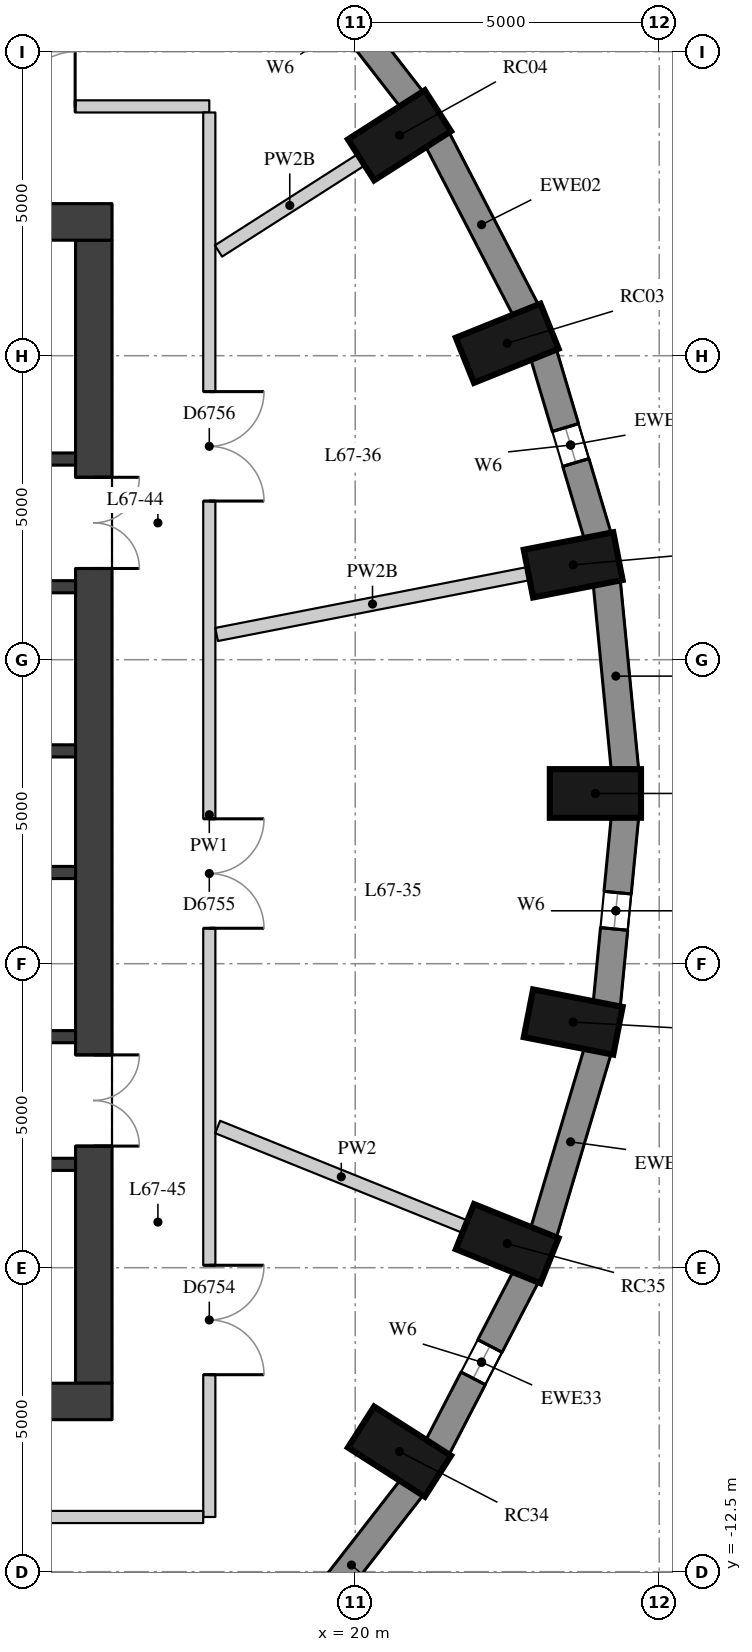
"""IFC4 building model, lengths in metres.
Left out: names, types, materials, properties, quantities, classifications, styles, units other than length and angle.
Written with IfcOpenShell. Run it as: python <this file> out.ifc"""

import sys

from ifc_helpers import new_model, si_unit, direction, frame, frame_2d, origin, origin_2d, place, context, subcontext, project, spatial, rectangle, extrude, element, fill, save


model = new_model("IFC4")
c1 = context("Model", 3, precision=1e-05, world=origin(), true_north=direction((0.0, 1.0)))
c2 = subcontext(c1, "Body", "Model", "MODEL_VIEW")
j1 = project(units=[si_unit("LENGTHUNIT", "METRE"), si_unit("PLANEANGLEUNIT", "RADIAN")], contexts=[c1])
p1 = place(None, origin())
s1 = spatial("IfcSite", under=j1, at=p1, CompositionType="ELEMENT")
p2 = place(p1, origin())
s2 = spatial("IfcBuilding", under=s1, at=p2, CompositionType="ELEMENT")
p3 = place(p2, frame((0.0, 0.0, 236.6)))
s3 = spatial("IfcBuildingStorey", under=s2, at=p3, CompositionType="ELEMENT", Elevation=236.6)
for number, where, z_axis, x_axis in (
    (1, (23.95, 0.3, 0.0), (0.0, 0.0, 1.0), (1.0, 0.0, 0.0)),
    (2, (23.585, 4.06, 0.0), (0.0, 0.0, 1.0), (0.981, 0.192, 0.0)),
    (3, (22.5, 7.705, 0.0), (0.0, 0.0, 1.0), (0.928, 0.374, 0.0)),
    (4, (20.728, 11.125, 0.0), (0.0, 0.0, 1.0), (0.843, 0.539, 0.0)),
    (5, (20.728, -10.525, 0.0), (0.0, 0.0, 1.0), (0.843, -0.539, 0.0)),
    (6, (22.5, -7.105, 0.0), (0.0, 0.0, 1.0), (0.928, -0.374, 0.0)),
    (7, (23.585, -3.459, 0.0), (0.0, 0.0, 1.0), (0.981, -0.192, 0.0)),
):
    element("IfcColumn", number, at=place(p3, frame(where, z_axis=z_axis, x_axis=x_axis)), inside=s3, PredefinedType="COLUMN", context=c2, shape_type="SweptSolid", body=[
        extrude(rectangle(XDim=1.5, YDim=0.8, at=origin_2d()), origin(), (0.0, 0.0, 1.0), 3.3),
    ])
p4 = place(p3, frame((24.437, 0.68, 0.0), z_axis=(0.0, 0.0, 1.0), x_axis=(-0.096740086873, 0.995309678237, 0.0)))
e8 = element("IfcWall", 8, at=p4, inside=s3, PredefinedType="SOLIDWALL", context=c2, shape_type="SweptSolid", body=[
    extrude(rectangle(XDim=3.114, YDim=0.45, at=frame_2d((1.557, 0.0))), origin(), (0.0, 0.0, 1.0), 3.02),
])
p5 = place(p3, frame((23.99, 4.526, 0.0), z_axis=(0.0, 0.0, 1.0), x_axis=(-0.285263800865, 0.958449040855, 0.0)))
e9 = element("IfcWall", 9, at=p5, inside=s3, PredefinedType="SOLIDWALL", context=c2, shape_type="SweptSolid", body=[
    extrude(rectangle(XDim=3.139, YDim=0.45, at=frame_2d((1.57, 0.0))), origin(), (0.0, 0.0, 1.0), 3.02),
])
p6 = place(p5, frame((1.27, 0.0, 0.4)))
e10 = element("IfcOpeningElement", 10, at=p6, cuts=e9, PredefinedType="OPENING", context=c2, shape_type="SweptSolid", body=[
    extrude(rectangle(XDim=0.6, YDim=1.75, at=frame_2d((0.3, 0.875))), frame((0.0, 0.235, 0.0), z_axis=(0.0, -1.0, 0.0), x_axis=(1.0, 0.0, 0.0)), (0.0, 0.0, 1.0), 0.47),
])
p7 = place(p3, frame((22.81, 8.24, 0.0), z_axis=(0.0, 0.0, 1.0), x_axis=(-0.459889857669, 0.887975967475, 0.0)))
e11 = element("IfcWall", 11, at=p7, inside=s3, PredefinedType="SOLIDWALL", context=c2, shape_type="SweptSolid", body=[
    extrude(rectangle(XDim=3.186, YDim=0.45, at=frame_2d((1.593, 0.0))), origin(), (0.0, 0.0, 1.0), 3.02),
])
p8 = place(p3, frame((20.935, 11.708, 0.0), z_axis=(0.0, 0.0, 1.0), x_axis=(-0.613862536705, 0.789412937587, 0.0)))
e12 = element("IfcWall", 12, at=p8, inside=s3, PredefinedType="SOLIDWALL", context=c2, shape_type="SweptSolid", body=[
    extrude(rectangle(XDim=3.247, YDim=0.45, at=frame_2d((1.624, 0.0))), origin(), (0.0, 0.0, 1.0), 3.02),
])
p9 = place(p8, frame((1.324, 0.0, 0.4)))
e13 = element("IfcOpeningElement", 13, at=p9, cuts=e12, PredefinedType="OPENING", context=c2, shape_type="SweptSolid", body=[
    extrude(rectangle(XDim=0.6, YDim=1.75, at=frame_2d((0.3, 0.875))), frame((0.0, 0.235, 0.0), z_axis=(0.0, -1.0, 0.0), x_axis=(1.0, 0.0, 0.0)), (0.0, 0.0, 1.0), 0.47),
])
p10 = place(p3, frame((18.942, -13.672, 0.0), z_axis=(0.0, 0.0, 1.0), x_axis=(0.613898970825, 0.789384604372, 0.0)))
e14 = element("IfcWall", 14, at=p10, inside=s3, PredefinedType="SOLIDWALL", context=c2, shape_type="SweptSolid", body=[
    extrude(rectangle(XDim=3.247, YDim=0.45, at=frame_2d((1.624, 0.0))), origin(), (0.0, 0.0, 1.0), 3.02),
])
p11 = place(p3, frame((21.345, -10.468, 0.0), z_axis=(0.0, 0.0, 1.0), x_axis=(0.459921155255, 0.887959757505, 0.0)))
e15 = element("IfcWall", 15, at=p11, inside=s3, PredefinedType="SOLIDWALL", context=c2, shape_type="SweptSolid", body=[
    extrude(rectangle(XDim=3.186, YDim=0.45, at=frame_2d((1.593, 0.0))), origin(), (0.0, 0.0, 1.0), 3.02),
])
p12 = place(p11, frame((1.293, 0.0, 0.4)))
e16 = element("IfcOpeningElement", 16, at=p12, cuts=e15, PredefinedType="OPENING", context=c2, shape_type="SweptSolid", body=[
    extrude(rectangle(XDim=0.6, YDim=1.75, at=frame_2d((0.3, 0.875))), frame((0.0, 0.235, 0.0), z_axis=(0.0, -1.0, 0.0), x_axis=(1.0, 0.0, 0.0)), (0.0, 0.0, 1.0), 0.47),
])
p13 = place(p3, frame((23.094, -6.935, 0.0), z_axis=(0.0, 0.0, 1.0), x_axis=(0.285263800865, 0.958449040855, 0.0)))
e17 = element("IfcWall", 17, at=p13, inside=s3, PredefinedType="SOLIDWALL", context=c2, shape_type="SweptSolid", body=[
    extrude(rectangle(XDim=3.139, YDim=0.45, at=frame_2d((1.57, 0.0))), origin(), (0.0, 0.0, 1.0), 3.02),
])
p14 = place(p3, frame((24.136, -3.18, 0.0), z_axis=(0.0, 0.0, 1.0), x_axis=(0.09673253904, 0.995310411827, 0.0)))
e18 = element("IfcWall", 18, at=p14, inside=s3, PredefinedType="SOLIDWALL", context=c2, shape_type="SweptSolid", body=[
    extrude(rectangle(XDim=3.115, YDim=0.45, at=frame_2d((1.557, 0.0))), origin(), (0.0, 0.0, 1.0), 3.02),
])
p15 = place(p14, frame((1.257, 0.0, 0.4)))
e19 = element("IfcOpeningElement", 19, at=p15, cuts=e18, PredefinedType="OPENING", context=c2, shape_type="SweptSolid", body=[
    extrude(rectangle(XDim=0.6, YDim=1.75, at=frame_2d((0.3, 0.875))), frame((0.0, 0.235, 0.0), z_axis=(0.0, -1.0, 0.0), x_axis=(1.0, 0.0, 0.0)), (0.0, 0.0, 1.0), 0.47),
])
p16 = place(p3, frame((15.7, -9.4, 0.0), z_axis=(0.0, 0.0, 1.0), x_axis=(0.0, 1.0, 0.0)))
e20 = element("IfcWall", 20, at=p16, inside=s3, PredefinedType="SHEAR", context=c2, shape_type="SweptSolid", body=[
    extrude(rectangle(XDim=18.8, YDim=0.6, at=frame_2d((9.4, 0.0))), origin(), (0.0, 0.0, 1.0), 3.02),
])
p17 = place(p16, frame((13.4, 0.0, 0.0)))
e21 = element("IfcOpeningElement", 21, at=p17, cuts=e20, PredefinedType="OPENING", context=c2, shape_type="SweptSolid", body=[
    extrude(rectangle(XDim=1.5, YDim=2.1, at=frame_2d((0.75, 1.05))), frame((0.0, 0.31, 0.0), z_axis=(0.0, -1.0, 0.0), x_axis=(1.0, 0.0, 0.0)), (0.0, 0.0, 1.0), 0.62),
])
p18 = place(p16, frame((3.9, 0.0, 0.0)))
e22 = element("IfcOpeningElement", 22, at=p18, cuts=e20, PredefinedType="OPENING", context=c2, shape_type="SweptSolid", body=[
    extrude(rectangle(XDim=1.5, YDim=2.1, at=frame_2d((0.75, 1.05))), frame((0.0, 0.31, 0.0), z_axis=(0.0, -1.0, 0.0), x_axis=(1.0, 0.0, 0.0)), (0.0, 0.0, 1.0), 0.62),
])
for number, where, z_axis, x_axis in (
    (23, (4.0, 9.7, 0.0), (0.0, 0.0, 1.0), (1.0, 0.0, 0.0)),
    (24, (4.0, -9.7, 0.0), (0.0, 0.0, 1.0), (1.0, 0.0, 0.0)),
):
    element("IfcWall", number, at=place(p3, frame(where, z_axis=z_axis, x_axis=x_axis)), inside=s3, PredefinedType="SHEAR", context=c2, shape_type="SweptSolid", body=[
        extrude(rectangle(XDim=12.0, YDim=0.6, at=frame_2d((6.0, 0.0))), origin(), (0.0, 0.0, 1.0), 3.02),
    ])
p19 = place(p3, frame((4.6, 5.8, 0.0), z_axis=(0.0, 0.0, 1.0), x_axis=(1.0, 0.0, 0.0)))
e25 = element("IfcWall", 25, at=p19, inside=s3, PredefinedType="SHEAR", context=c2, shape_type="SweptSolid", body=[
    extrude(rectangle(XDim=10.8, YDim=0.2, at=frame_2d((5.4, 0.0))), origin(), (0.0, 0.0, 1.0), 3.02),
])
p20 = place(p19, frame((7.05, 0.0, 0.0)))
e26 = element("IfcOpeningElement", 26, at=p20, cuts=e25, PredefinedType="OPENING", context=c2, shape_type="SweptSolid", body=[
    extrude(rectangle(XDim=1.1, YDim=2.1, at=frame_2d((0.55, 1.05))), frame((0.0, 0.11, 0.0), z_axis=(0.0, -1.0, 0.0), x_axis=(1.0, 0.0, 0.0)), (0.0, 0.0, 1.0), 0.22),
])
p21 = place(p19, frame((9.05, 0.0, 0.0)))
e27 = element("IfcOpeningElement", 27, at=p21, cuts=e25, PredefinedType="OPENING", context=c2, shape_type="SweptSolid", body=[
    extrude(rectangle(XDim=1.1, YDim=2.1, at=frame_2d((0.55, 1.05))), frame((0.0, 0.11, 0.0), z_axis=(0.0, -1.0, 0.0), x_axis=(1.0, 0.0, 0.0)), (0.0, 0.0, 1.0), 0.22),
])
p22 = place(p3, frame((4.6, 3.7, 0.0), z_axis=(0.0, 0.0, 1.0), x_axis=(1.0, 0.0, 0.0)))
e28 = element("IfcWall", 28, at=p22, inside=s3, PredefinedType="SHEAR", context=c2, shape_type="SweptSolid", body=[
    extrude(rectangle(XDim=10.8, YDim=0.2, at=frame_2d((5.4, 0.0))), origin(), (0.0, 0.0, 1.0), 3.02),
])
p23 = place(p22, frame((6.6, 0.0, 0.0)))
e29 = element("IfcOpeningElement", 29, at=p23, cuts=e28, PredefinedType="OPENING", context=c2, shape_type="SweptSolid", body=[
    extrude(rectangle(XDim=1.1, YDim=2.1, at=frame_2d((0.55, 1.05))), frame((0.0, 0.11, 0.0), z_axis=(0.0, -1.0, 0.0), x_axis=(1.0, 0.0, 0.0)), (0.0, 0.0, 1.0), 0.22),
])
p24 = place(p22, frame((8.9, 0.0, 0.0)))
e30 = element("IfcOpeningElement", 30, at=p24, cuts=e28, PredefinedType="OPENING", context=c2, shape_type="SweptSolid", body=[
    extrude(rectangle(XDim=1.1, YDim=2.1, at=frame_2d((0.55, 1.05))), frame((0.0, 0.11, 0.0), z_axis=(0.0, -1.0, 0.0), x_axis=(1.0, 0.0, 0.0)), (0.0, 0.0, 1.0), 0.22),
])
for number, where, z_axis, x_axis in (
    (31, (4.6, 1.0, 0.0), (0.0, 0.0, 1.0), (1.0, 0.0, 0.0)),
    (32, (4.6, -1.0, 0.0), (0.0, 0.0, 1.0), (1.0, 0.0, 0.0)),
):
    element("IfcWall", number, at=place(p3, frame(where, z_axis=z_axis, x_axis=x_axis)), inside=s3, PredefinedType="SHEAR", context=c2, shape_type="SweptSolid", body=[
        extrude(rectangle(XDim=10.8, YDim=0.2, at=frame_2d((5.4, 0.0))), origin(), (0.0, 0.0, 1.0), 3.02),
    ])
p25 = place(p3, frame((4.6, -3.7, 0.0), z_axis=(0.0, 0.0, 1.0), x_axis=(1.0, 0.0, 0.0)))
e33 = element("IfcWall", 33, at=p25, inside=s3, PredefinedType="SHEAR", context=c2, shape_type="SweptSolid", body=[
    extrude(rectangle(XDim=10.8, YDim=0.2, at=frame_2d((5.4, 0.0))), origin(), (0.0, 0.0, 1.0), 3.02),
])
p26 = place(p25, frame((6.6, 0.0, 0.0)))
e34 = element("IfcOpeningElement", 34, at=p26, cuts=e33, PredefinedType="OPENING", context=c2, shape_type="SweptSolid", body=[
    extrude(rectangle(XDim=1.1, YDim=2.1, at=frame_2d((0.55, 1.05))), frame((0.0, 0.11, 0.0), z_axis=(0.0, -1.0, 0.0), x_axis=(1.0, 0.0, 0.0)), (0.0, 0.0, 1.0), 0.22),
])
p27 = place(p25, frame((8.9, 0.0, 0.0)))
e35 = element("IfcOpeningElement", 35, at=p27, cuts=e33, PredefinedType="OPENING", context=c2, shape_type="SweptSolid", body=[
    extrude(rectangle(XDim=1.1, YDim=2.1, at=frame_2d((0.55, 1.05))), frame((0.0, 0.11, 0.0), z_axis=(0.0, -1.0, 0.0), x_axis=(1.0, 0.0, 0.0)), (0.0, 0.0, 1.0), 0.22),
])
p28 = place(p3, frame((4.6, -5.8, 0.0), z_axis=(0.0, 0.0, 1.0), x_axis=(1.0, 0.0, 0.0)))
e36 = element("IfcWall", 36, at=p28, inside=s3, PredefinedType="SHEAR", context=c2, shape_type="SweptSolid", body=[
    extrude(rectangle(XDim=10.8, YDim=0.2, at=frame_2d((5.4, 0.0))), origin(), (0.0, 0.0, 1.0), 3.02),
])
p29 = place(p3, frame((6.045, 11.6, 0.0), z_axis=(0.0, 0.0, 1.0), x_axis=(1.0, 0.0, 0.0)))
e37 = element("IfcWall", 37, at=p29, inside=s3, PredefinedType="PARTITIONING", context=c2, shape_type="SweptSolid", body=[
    extrude(rectangle(XDim=11.555, YDim=0.2, at=frame_2d((5.777, 0.0))), origin(), (0.0, 0.0, 1.0), 3.02),
])
p30 = place(p29, frame((1.461, 0.0, 0.0)))
e38 = element("IfcOpeningElement", 38, at=p30, cuts=e37, PredefinedType="OPENING", context=c2, shape_type="SweptSolid", body=[
    extrude(rectangle(XDim=1.1, YDim=2.1, at=frame_2d((0.55, 1.05))), frame((0.0, 0.11, 0.0), z_axis=(0.0, -1.0, 0.0), x_axis=(1.0, 0.0, 0.0)), (0.0, 0.0, 1.0), 0.22),
])
p31 = place(p29, frame((7.549, 0.0, 0.0)))
e39 = element("IfcOpeningElement", 39, at=p31, cuts=e37, PredefinedType="OPENING", context=c2, shape_type="SweptSolid", body=[
    extrude(rectangle(XDim=1.8, YDim=2.1, at=frame_2d((0.9, 1.05))), frame((0.0, 0.11, 0.0), z_axis=(0.0, -1.0, 0.0), x_axis=(1.0, 0.0, 0.0)), (0.0, 0.0, 1.0), 0.22),
])
p32 = place(p3, frame((17.6, 11.5, 0.0), z_axis=(0.0, 0.0, 1.0), x_axis=(0.0, -1.0, 0.0)))
e40 = element("IfcWall", 40, at=p32, inside=s3, PredefinedType="PARTITIONING", context=c2, shape_type="SweptSolid", body=[
    extrude(rectangle(XDim=23.1, YDim=0.2, at=frame_2d((11.55, 0.0))), origin(), (0.0, 0.0, 1.0), 3.02),
])
p33 = place(p32, frame((18.96, 0.0, 0.0)))
e41 = element("IfcOpeningElement", 41, at=p33, cuts=e40, PredefinedType="OPENING", context=c2, shape_type="SweptSolid", body=[
    extrude(rectangle(XDim=1.8, YDim=2.1, at=frame_2d((0.9, 1.05))), frame((0.0, 0.11, 0.0), z_axis=(0.0, -1.0, 0.0), x_axis=(1.0, 0.0, 0.0)), (0.0, 0.0, 1.0), 0.22),
])
p34 = place(p32, frame((11.617, 0.0, 0.0)))
e42 = element("IfcOpeningElement", 42, at=p34, cuts=e40, PredefinedType="OPENING", context=c2, shape_type="SweptSolid", body=[
    extrude(rectangle(XDim=1.8, YDim=2.1, at=frame_2d((0.9, 1.05))), frame((0.0, 0.11, 0.0), z_axis=(0.0, -1.0, 0.0), x_axis=(1.0, 0.0, 0.0)), (0.0, 0.0, 1.0), 0.22),
])
p35 = place(p32, frame((4.591, 0.0, 0.0)))
e43 = element("IfcOpeningElement", 43, at=p35, cuts=e40, PredefinedType="OPENING", context=c2, shape_type="SweptSolid", body=[
    extrude(rectangle(XDim=1.8, YDim=2.1, at=frame_2d((0.9, 1.05))), frame((0.0, 0.11, 0.0), z_axis=(0.0, -1.0, 0.0), x_axis=(1.0, 0.0, 0.0)), (0.0, 0.0, 1.0), 0.22),
])
p36 = place(p3, frame((17.5, -11.6, 0.0), z_axis=(0.0, 0.0, 1.0), x_axis=(-1.0, 0.0, 0.0)))
e44 = element("IfcWall", 44, at=p36, inside=s3, PredefinedType="PARTITIONING", context=c2, shape_type="SweptSolid", body=[
    extrude(rectangle(XDim=10.562, YDim=0.2, at=frame_2d((5.281, 0.0))), origin(), (0.0, 0.0, 1.0), 3.02),
])
p37 = place(p3, frame((22.849, 3.916, 0.0), z_axis=(0.0, 0.0, 1.0), x_axis=(-0.981474096155, -0.191594881394, 0.0)))
e45 = element("IfcWall", 45, at=p37, inside=s3, PredefinedType="PARTITIONING", context=c2, shape_type="SweptSolid", body=[
    extrude(rectangle(XDim=5.226, YDim=0.22, at=frame_2d((2.613, 0.0))), origin(), (0.0, 0.0, 1.0), 2.57),
])
p38 = place(p3, frame((20.096, 10.721, 0.0), z_axis=(0.0, 0.0, 1.0), x_axis=(-0.842583486412, -0.538565751256, 0.0)))
e46 = element("IfcWall", 46, at=p38, inside=s3, PredefinedType="PARTITIONING", context=c2, shape_type="SweptSolid", body=[
    extrude(rectangle(XDim=2.783, YDim=0.22, at=frame_2d((1.392, 0.0))), origin(), (0.0, 0.0, 1.0), 2.57),
])
p39 = place(p3, frame((21.804, -6.824, 0.0), z_axis=(0.0, 0.0, 1.0), x_axis=(-0.927528978592, 0.373751245981, 0.0)))
e47 = element("IfcWall", 47, at=p39, inside=s3, PredefinedType="PARTITIONING", context=c2, shape_type="SweptSolid", body=[
    extrude(rectangle(XDim=4.384, YDim=0.22, at=frame_2d((2.192, 0.0))), origin(), (0.0, 0.0, 1.0), 3.02),
])
p40 = place(p6, origin())
e48 = element("IfcWindow", 48, at=p40, inside=s3, PartitioningType="SINGLE_PANEL", PredefinedType="WINDOW", context=c2, shape_type="SweptSolid", body=[
    extrude(rectangle(XDim=0.6, YDim=1.75, at=frame_2d((0.3, 0.875))), frame((0.0, 0.035, 0.0), z_axis=(0.0, -1.0, 0.0), x_axis=(1.0, 0.0, 0.0)), (0.0, 0.0, 1.0), 0.06),
])
fill(e10, e48)
p41 = place(p12, origin())
e49 = element("IfcWindow", 49, at=p41, inside=s3, PartitioningType="SINGLE_PANEL", PredefinedType="WINDOW", context=c2, shape_type="SweptSolid", body=[
    extrude(rectangle(XDim=0.6, YDim=1.75, at=frame_2d((0.3, 0.875))), frame((0.0, 0.035, 0.0), z_axis=(0.0, -1.0, 0.0), x_axis=(1.0, 0.0, 0.0)), (0.0, 0.0, 1.0), 0.06),
])
fill(e16, e49)
p42 = place(p15, origin())
e50 = element("IfcWindow", 50, at=p42, inside=s3, PartitioningType="SINGLE_PANEL", PredefinedType="WINDOW", context=c2, shape_type="SweptSolid", body=[
    extrude(rectangle(XDim=0.6, YDim=1.75, at=frame_2d((0.3, 0.875))), frame((0.0, 0.035, 0.0), z_axis=(0.0, -1.0, 0.0), x_axis=(1.0, 0.0, 0.0)), (0.0, 0.0, 1.0), 0.06),
])
fill(e19, e50)
p43 = place(p17, origin())
e51 = element("IfcDoor", 51, at=p43, inside=s3, OperationType="DOUBLE_DOOR_SINGLE_SWING", PredefinedType="DOOR", context=c2, shape_type="SweptSolid", body=[
    extrude(rectangle(XDim=1.5, YDim=2.1, at=frame_2d((0.75, 1.05))), frame((0.0, 0.025, 0.0), z_axis=(0.0, -1.0, 0.0), x_axis=(1.0, 0.0, 0.0)), (0.0, 0.0, 1.0), 0.05),
])
fill(e21, e51)
p44 = place(p18, origin())
e52 = element("IfcDoor", 52, at=p44, inside=s3, OperationType="DOUBLE_DOOR_SINGLE_SWING", PredefinedType="DOOR", context=c2, shape_type="SweptSolid", body=[
    extrude(rectangle(XDim=1.5, YDim=2.1, at=frame_2d((0.75, 1.05))), frame((0.0, 0.025, 0.0), z_axis=(0.0, -1.0, 0.0), x_axis=(1.0, 0.0, 0.0)), (0.0, 0.0, 1.0), 0.05),
])
fill(e22, e52)
p45 = place(p33, origin())
e53 = element("IfcDoor", 53, at=p45, inside=s3, OperationType="DOUBLE_DOOR_SINGLE_SWING", PredefinedType="DOOR", context=c2, shape_type="SweptSolid", body=[
    extrude(rectangle(XDim=1.8, YDim=2.1, at=frame_2d((0.9, 1.05))), frame((0.0, 0.025, 0.0), z_axis=(0.0, -1.0, 0.0), x_axis=(1.0, 0.0, 0.0)), (0.0, 0.0, 1.0), 0.05),
])
fill(e41, e53)
p46 = place(p34, origin())
e54 = element("IfcDoor", 54, at=p46, inside=s3, OperationType="DOUBLE_DOOR_SINGLE_SWING", PredefinedType="DOOR", context=c2, shape_type="SweptSolid", body=[
    extrude(rectangle(XDim=1.8, YDim=2.1, at=frame_2d((0.9, 1.05))), frame((0.0, 0.025, 0.0), z_axis=(0.0, -1.0, 0.0), x_axis=(1.0, 0.0, 0.0)), (0.0, 0.0, 1.0), 0.05),
])
fill(e42, e54)
p47 = place(p35, origin())
e55 = element("IfcDoor", 55, at=p47, inside=s3, OperationType="DOUBLE_DOOR_SINGLE_SWING", PredefinedType="DOOR", context=c2, shape_type="SweptSolid", body=[
    extrude(rectangle(XDim=1.8, YDim=2.1, at=frame_2d((0.9, 1.05))), frame((0.0, 0.025, 0.0), z_axis=(0.0, -1.0, 0.0), x_axis=(1.0, 0.0, 0.0)), (0.0, 0.0, 1.0), 0.05),
])
fill(e43, e55)
p48 = place(p31, origin())
e56 = element("IfcDoor", 56, at=p48, inside=s3, OperationType="DOUBLE_DOOR_SINGLE_SWING", PredefinedType="DOOR", context=c2, shape_type="SweptSolid", body=[
    extrude(rectangle(XDim=1.8, YDim=2.1, at=frame_2d((0.9, 1.05))), frame((0.0, 0.025, 0.0), z_axis=(0.0, -1.0, 0.0), x_axis=(1.0, 0.0, 0.0)), (0.0, 0.0, 1.0), 0.05),
])
fill(e39, e56)
save(model, sys.argv[1])
